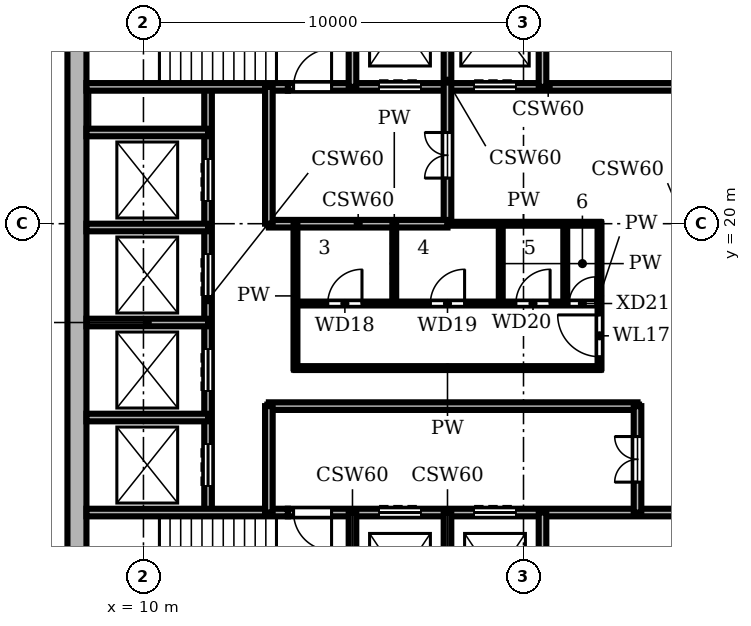
"""IFC4 building model, lengths in metres.
Left out: names, types, materials, properties, quantities, classifications, styles, units other than length and angle.
Written with IfcOpenShell. Run it as: python <this file> out.ifc"""

import sys

from ifc_helpers import new_model, si_unit, direction, frame, frame_2d, origin, place, context, subcontext, project, spatial, rectangle, extrude, element, fill, save


model = new_model("IFC4")
c1 = context("Model", 3, precision=1e-05, world=origin(), true_north=direction((0.0, 1.0)))
c2 = subcontext(c1, "Body", "Model", "MODEL_VIEW")
j1 = project(units=[si_unit("LENGTHUNIT", "METRE"), si_unit("PLANEANGLEUNIT", "RADIAN")], contexts=[c1])
p1 = place(None, origin())
s1 = spatial("IfcSite", under=j1, at=p1, CompositionType="ELEMENT")
p2 = place(p1, origin())
s2 = spatial("IfcBuilding", under=s1, at=p2, CompositionType="ELEMENT")
p3 = place(p2, frame((0.0, 0.0, 329.4)))
s3 = spatial("IfcBuildingStorey", under=s2, at=p3, CompositionType="ELEMENT", Elevation=329.4)
p4 = place(p3, frame((8.25, 27.5, 0.0), z_axis=(0.0, 0.0, 1.0), x_axis=(0.0, -1.0, 0.0)))
e1 = element("IfcWall", 1, at=p4, inside=s3, PredefinedType="SHEAR", context=c2, shape_type="SweptSolid", body=[
    extrude(rectangle(XDim=19.0, YDim=0.5, at=frame_2d((9.5, 0.0))), origin(), (0.0, 0.0, 1.0), 3.9),
])
p5 = place(p3, frame((8.5, 12.4, 0.0), z_axis=(0.0, 0.0, 1.0), x_axis=(1.0, 0.0, 0.0)))
e2 = element("IfcWall", 2, at=p5, inside=s3, PredefinedType="SHEAR", context=c2, shape_type="SweptSolid", body=[
    extrude(rectangle(XDim=5.3, YDim=0.2, at=frame_2d((2.65, 0.0))), origin(), (0.0, 0.0, 1.0), 3.45),
])
p6 = place(p3, frame((13.8, 12.4, 0.0), z_axis=(0.0, 0.0, 1.0), x_axis=(1.0, 0.0, 0.0)))
e3 = element("IfcWall", 3, at=p6, inside=s3, PredefinedType="SHEAR", context=c2, shape_type="SweptSolid", body=[
    extrude(rectangle(XDim=13.7, YDim=0.2, at=frame_2d((6.85, 0.0))), origin(), (0.0, 0.0, 1.0), 3.45),
])
p7 = place(p6, frame((2.4, 0.0, 0.0)))
e4 = element("IfcOpeningElement", 4, at=p7, cuts=e3, PredefinedType="OPENING", context=c2, shape_type="SweptSolid", body=[
    extrude(rectangle(XDim=1.1, YDim=2.1, at=frame_2d((0.55, 1.05))), frame((0.0, 0.11, 0.0), z_axis=(0.0, -1.0, 0.0), x_axis=(1.0, 0.0, 0.0)), (0.0, 0.0, 1.0), 0.22),
])
p8 = place(p6, frame((4.9, 0.0, 0.0)))
e5 = element("IfcOpeningElement", 5, at=p8, cuts=e3, PredefinedType="OPENING", context=c2, shape_type="SweptSolid", body=[
    extrude(rectangle(XDim=1.1, YDim=2.1, at=frame_2d((0.55, 1.05))), frame((0.0, 0.11, 0.0), z_axis=(0.0, -1.0, 0.0), x_axis=(1.0, 0.0, 0.0)), (0.0, 0.0, 1.0), 0.22),
])
p9 = place(p6, frame((0.15, 0.0, 0.0)))
e6 = element("IfcOpeningElement", 6, at=p9, cuts=e3, PredefinedType="OPENING", context=c2, shape_type="SweptSolid", body=[
    extrude(rectangle(XDim=1.0, YDim=2.1, at=frame_2d((0.5, 1.05))), frame((0.0, 0.11, 0.0), z_axis=(0.0, -1.0, 0.0), x_axis=(1.0, 0.0, 0.0)), (0.0, 0.0, 1.0), 0.22),
])
p10 = place(p3, frame((8.5, 14.9, 0.0), z_axis=(0.0, 0.0, 1.0), x_axis=(1.0, 0.0, 0.0)))
e7 = element("IfcWall", 7, at=p10, inside=s3, PredefinedType="SHEAR", context=c2, shape_type="SweptSolid", body=[
    extrude(rectangle(XDim=3.2, YDim=0.2, at=frame_2d((1.6, 0.0))), origin(), (0.0, 0.0, 1.0), 3.45),
])
p11 = place(p3, frame((13.3, 15.2, 0.0), z_axis=(0.0, 0.0, 1.0), x_axis=(1.0, 0.0, 0.0)))
e8 = element("IfcWall", 8, at=p11, inside=s3, PredefinedType="SHEAR", context=c2, shape_type="SweptSolid", body=[
    extrude(rectangle(XDim=9.7, YDim=0.2, at=frame_2d((4.85, 0.0))), origin(), (0.0, 0.0, 1.0), 3.45),
])
p12 = place(p3, frame((14.0, 16.2, 0.0), z_axis=(0.0, 0.0, 1.0), x_axis=(1.0, 0.0, 0.0)))
e9 = element("IfcWall", 9, at=p12, inside=s3, PredefinedType="PARTITIONING", context=c2, shape_type="SweptSolid", body=[
    extrude(rectangle(XDim=8.0, YDim=0.1, at=frame_2d((4.0, 0.0))), origin(), (0.0, 0.0, 1.0), 3.45),
])
p13 = place(p3, frame((8.5, 17.4, 0.0), z_axis=(0.0, 0.0, 1.0), x_axis=(1.0, 0.0, 0.0)))
e10 = element("IfcWall", 10, at=p13, inside=s3, PredefinedType="SHEAR", context=c2, shape_type="SweptSolid", body=[
    extrude(rectangle(XDim=3.2, YDim=0.2, at=frame_2d((1.6, 0.0))), origin(), (0.0, 0.0, 1.0), 3.45),
])
p14 = place(p3, frame((14.0, 17.9, 0.0), z_axis=(0.0, 0.0, 1.0), x_axis=(1.0, 0.0, 0.0)))
e11 = element("IfcWall", 11, at=p14, inside=s3, PredefinedType="PARTITIONING", context=c2, shape_type="SweptSolid", body=[
    extrude(rectangle(XDim=8.0, YDim=0.1, at=frame_2d((4.0, 0.0))), origin(), (0.0, 0.0, 1.0), 3.45),
])
p15 = place(p14, frame((0.85, 0.0, 0.0)))
e12 = element("IfcOpeningElement", 12, at=p15, cuts=e11, PredefinedType="OPENING", context=c2, shape_type="SweptSolid", body=[
    extrude(rectangle(XDim=0.9, YDim=2.1, at=frame_2d((0.45, 1.05))), frame((0.0, 0.06, 0.0), z_axis=(0.0, -1.0, 0.0), x_axis=(1.0, 0.0, 0.0)), (0.0, 0.0, 1.0), 0.12),
])
p16 = place(p14, frame((3.55, 0.0, 0.0)))
e13 = element("IfcOpeningElement", 13, at=p16, cuts=e11, PredefinedType="OPENING", context=c2, shape_type="SweptSolid", body=[
    extrude(rectangle(XDim=0.9, YDim=2.1, at=frame_2d((0.45, 1.05))), frame((0.0, 0.06, 0.0), z_axis=(0.0, -1.0, 0.0), x_axis=(1.0, 0.0, 0.0)), (0.0, 0.0, 1.0), 0.12),
])
p17 = place(p14, frame((5.8, 0.0, 0.0)))
e14 = element("IfcOpeningElement", 14, at=p17, cuts=e11, PredefinedType="OPENING", context=c2, shape_type="SweptSolid", body=[
    extrude(rectangle(XDim=0.9, YDim=2.1, at=frame_2d((0.45, 1.05))), frame((0.0, 0.06, 0.0), z_axis=(0.0, -1.0, 0.0), x_axis=(1.0, 0.0, 0.0)), (0.0, 0.0, 1.0), 0.12),
])
p18 = place(p14, frame((7.2, 0.0, 0.0)))
e15 = element("IfcOpeningElement", 15, at=p18, cuts=e11, PredefinedType="OPENING", context=c2, shape_type="SweptSolid", body=[
    extrude(rectangle(XDim=0.7, YDim=2.1, at=frame_2d((0.35, 1.05))), frame((0.0, 0.06, 0.0), z_axis=(0.0, -1.0, 0.0), x_axis=(1.0, 0.0, 0.0)), (0.0, 0.0, 1.0), 0.12),
])
p19 = place(p3, frame((8.5, 19.9, 0.0), z_axis=(0.0, 0.0, 1.0), x_axis=(1.0, 0.0, 0.0)))
e16 = element("IfcWall", 16, at=p19, inside=s3, PredefinedType="SHEAR", context=c2, shape_type="SweptSolid", body=[
    extrude(rectangle(XDim=3.2, YDim=0.2, at=frame_2d((1.6, 0.0))), origin(), (0.0, 0.0, 1.0), 3.45),
])
p20 = place(p3, frame((18.0, 20.0, 0.0), z_axis=(0.0, 0.0, 1.0), x_axis=(1.0, 0.0, 0.0)))
e17 = element("IfcWall", 17, at=p20, inside=s3, PredefinedType="PARTITIONING", context=c2, shape_type="SweptSolid", body=[
    extrude(rectangle(XDim=4.0, YDim=0.1, at=frame_2d((2.0, 0.0))), origin(), (0.0, 0.0, 1.0), 3.45),
])
p21 = place(p3, frame((13.3, 20.0, 0.0), z_axis=(0.0, 0.0, 1.0), x_axis=(1.0, 0.0, 0.0)))
e18 = element("IfcWall", 18, at=p21, inside=s3, PredefinedType="SHEAR", context=c2, shape_type="SweptSolid", body=[
    extrude(rectangle(XDim=4.7, YDim=0.2, at=frame_2d((2.35, 0.0))), origin(), (0.0, 0.0, 1.0), 3.45),
])
p22 = place(p3, frame((8.5, 22.4, 0.0), z_axis=(0.0, 0.0, 1.0), x_axis=(1.0, 0.0, 0.0)))
e19 = element("IfcWall", 19, at=p22, inside=s3, PredefinedType="SHEAR", context=c2, shape_type="SweptSolid", body=[
    extrude(rectangle(XDim=3.2, YDim=0.2, at=frame_2d((1.6, 0.0))), origin(), (0.0, 0.0, 1.0), 3.45),
])
p23 = place(p3, frame((8.5, 23.6, 0.0), z_axis=(0.0, 0.0, 1.0), x_axis=(1.0, 0.0, 0.0)))
e20 = element("IfcWall", 20, at=p23, inside=s3, PredefinedType="SHEAR", context=c2, shape_type="SweptSolid", body=[
    extrude(rectangle(XDim=5.3, YDim=0.2, at=frame_2d((2.65, 0.0))), origin(), (0.0, 0.0, 1.0), 3.45),
])
p24 = place(p3, frame((13.8, 23.6, 0.0), z_axis=(0.0, 0.0, 1.0), x_axis=(1.0, 0.0, 0.0)))
e21 = element("IfcWall", 21, at=p24, inside=s3, PredefinedType="SHEAR", context=c2, shape_type="SweptSolid", body=[
    extrude(rectangle(XDim=13.7, YDim=0.2, at=frame_2d((6.85, 0.0))), origin(), (0.0, 0.0, 1.0), 3.45),
])
p25 = place(p24, frame((2.4, 0.0, 0.0)))
e22 = element("IfcOpeningElement", 22, at=p25, cuts=e21, PredefinedType="OPENING", context=c2, shape_type="SweptSolid", body=[
    extrude(rectangle(XDim=1.1, YDim=2.1, at=frame_2d((0.55, 1.05))), frame((0.0, 0.11, 0.0), z_axis=(0.0, -1.0, 0.0), x_axis=(1.0, 0.0, 0.0)), (0.0, 0.0, 1.0), 0.22),
])
p26 = place(p24, frame((4.9, 0.0, 0.0)))
e23 = element("IfcOpeningElement", 23, at=p26, cuts=e21, PredefinedType="OPENING", context=c2, shape_type="SweptSolid", body=[
    extrude(rectangle(XDim=1.1, YDim=2.1, at=frame_2d((0.55, 1.05))), frame((0.0, 0.11, 0.0), z_axis=(0.0, -1.0, 0.0), x_axis=(1.0, 0.0, 0.0)), (0.0, 0.0, 1.0), 0.22),
])
p27 = place(p24, frame((0.15, 0.0, 0.0)))
e24 = element("IfcOpeningElement", 24, at=p27, cuts=e21, PredefinedType="OPENING", context=c2, shape_type="SweptSolid", body=[
    extrude(rectangle(XDim=1.0, YDim=2.1, at=frame_2d((0.5, 1.05))), frame((0.0, 0.11, 0.0), z_axis=(0.0, -1.0, 0.0), x_axis=(1.0, 0.0, 0.0)), (0.0, 0.0, 1.0), 0.22),
])
p28 = place(p3, frame((11.7, 12.4, 0.0), z_axis=(0.0, 0.0, 1.0), x_axis=(0.0, 1.0, 0.0)))
e25 = element("IfcWall", 25, at=p28, inside=s3, PredefinedType="SHEAR", context=c2, shape_type="SweptSolid", body=[
    extrude(rectangle(XDim=11.2, YDim=0.2, at=frame_2d((5.6, 0.0))), origin(), (0.0, 0.0, 1.0), 3.45),
])
p29 = place(p28, frame((0.7, 0.0, 0.0)))
e26 = element("IfcOpeningElement", 26, at=p29, cuts=e25, PredefinedType="OPENING", context=c2, shape_type="SweptSolid", body=[
    extrude(rectangle(XDim=1.1, YDim=2.1, at=frame_2d((0.55, 1.05))), frame((0.0, 0.11, 0.0), z_axis=(0.0, -1.0, 0.0), x_axis=(1.0, 0.0, 0.0)), (0.0, 0.0, 1.0), 0.22),
])
p30 = place(p28, frame((3.2, 0.0, 0.0)))
e27 = element("IfcOpeningElement", 27, at=p30, cuts=e25, PredefinedType="OPENING", context=c2, shape_type="SweptSolid", body=[
    extrude(rectangle(XDim=1.1, YDim=2.1, at=frame_2d((0.55, 1.05))), frame((0.0, 0.11, 0.0), z_axis=(0.0, -1.0, 0.0), x_axis=(1.0, 0.0, 0.0)), (0.0, 0.0, 1.0), 0.22),
])
p31 = place(p28, frame((5.7, 0.0, 0.0)))
e28 = element("IfcOpeningElement", 28, at=p31, cuts=e25, PredefinedType="OPENING", context=c2, shape_type="SweptSolid", body=[
    extrude(rectangle(XDim=1.1, YDim=2.1, at=frame_2d((0.55, 1.05))), frame((0.0, 0.11, 0.0), z_axis=(0.0, -1.0, 0.0), x_axis=(1.0, 0.0, 0.0)), (0.0, 0.0, 1.0), 0.22),
])
p32 = place(p28, frame((8.2, 0.0, 0.0)))
e29 = element("IfcOpeningElement", 29, at=p32, cuts=e25, PredefinedType="OPENING", context=c2, shape_type="SweptSolid", body=[
    extrude(rectangle(XDim=1.1, YDim=2.1, at=frame_2d((0.55, 1.05))), frame((0.0, 0.11, 0.0), z_axis=(0.0, -1.0, 0.0), x_axis=(1.0, 0.0, 0.0)), (0.0, 0.0, 1.0), 0.22),
])
p33 = place(p3, frame((13.3, 12.4, 0.0), z_axis=(0.0, 0.0, 1.0), x_axis=(0.0, 1.0, 0.0)))
e30 = element("IfcWall", 30, at=p33, inside=s3, PredefinedType="SHEAR", context=c2, shape_type="SweptSolid", body=[
    extrude(rectangle(XDim=2.8, YDim=0.2, at=frame_2d((1.4, 0.0))), origin(), (0.0, 0.0, 1.0), 3.45),
])
p34 = place(p3, frame((13.3, 20.0, 0.0), z_axis=(0.0, 0.0, 1.0), x_axis=(0.0, 1.0, 0.0)))
e31 = element("IfcWall", 31, at=p34, inside=s3, PredefinedType="SHEAR", context=c2, shape_type="SweptSolid", body=[
    extrude(rectangle(XDim=3.6, YDim=0.2, at=frame_2d((1.8, 0.0))), origin(), (0.0, 0.0, 1.0), 3.45),
])
p35 = place(p3, frame((14.0, 16.2, 0.0), z_axis=(0.0, 0.0, 1.0), x_axis=(0.0, 1.0, 0.0)))
e32 = element("IfcWall", 32, at=p35, inside=s3, PredefinedType="PARTITIONING", context=c2, shape_type="SweptSolid", body=[
    extrude(rectangle(XDim=3.8, YDim=0.1, at=frame_2d((1.9, 0.0))), origin(), (0.0, 0.0, 1.0), 3.45),
])
for number, where, z_axis, x_axis in (
    (33, (15.5, 8.5, 0.0), (0.0, 0.0, 1.0), (0.0, 1.0, 0.0)),
    (34, (15.5, 23.6, 0.0), (0.0, 0.0, 1.0), (0.0, 1.0, 0.0)),
):
    element("IfcWall", number, at=place(p3, frame(where, z_axis=z_axis, x_axis=x_axis)), inside=s3, PredefinedType="SHEAR", context=c2, shape_type="SweptSolid", body=[
        extrude(rectangle(XDim=3.9, YDim=0.2, at=frame_2d((1.95, 0.0))), origin(), (0.0, 0.0, 1.0), 3.45),
    ])
p36 = place(p3, frame((16.6, 17.9, 0.0), z_axis=(0.0, 0.0, 1.0), x_axis=(0.0, 1.0, 0.0)))
e35 = element("IfcWall", 35, at=p36, inside=s3, PredefinedType="PARTITIONING", context=c2, shape_type="SweptSolid", body=[
    extrude(rectangle(XDim=2.1, YDim=0.1, at=frame_2d((1.05, 0.0))), origin(), (0.0, 0.0, 1.0), 3.45),
])
p37 = place(p3, frame((18.0, 8.5, 0.0), z_axis=(0.0, 0.0, 1.0), x_axis=(0.0, 1.0, 0.0)))
e36 = element("IfcWall", 36, at=p37, inside=s3, PredefinedType="SHEAR", context=c2, shape_type="SweptSolid", body=[
    extrude(rectangle(XDim=3.9, YDim=0.2, at=frame_2d((1.95, 0.0))), origin(), (0.0, 0.0, 1.0), 3.45),
])
p38 = place(p3, frame((18.0, 20.0, 0.0), z_axis=(0.0, 0.0, 1.0), x_axis=(0.0, 1.0, 0.0)))
e37 = element("IfcWall", 37, at=p38, inside=s3, PredefinedType="SHEAR", context=c2, shape_type="SweptSolid", body=[
    extrude(rectangle(XDim=7.5, YDim=0.2, at=frame_2d((3.75, 0.0))), origin(), (0.0, 0.0, 1.0), 3.45),
])
p39 = place(p38, frame((1.2, 0.0, 0.0)))
e38 = element("IfcOpeningElement", 38, at=p39, cuts=e37, PredefinedType="OPENING", context=c2, shape_type="SweptSolid", body=[
    extrude(rectangle(XDim=1.2, YDim=2.1, at=frame_2d((0.6, 1.05))), frame((0.0, 0.11, 0.0), z_axis=(0.0, -1.0, 0.0), x_axis=(1.0, 0.0, 0.0)), (0.0, 0.0, 1.0), 0.22),
])
p40 = place(p3, frame((19.4, 17.9, 0.0), z_axis=(0.0, 0.0, 1.0), x_axis=(0.0, 1.0, 0.0)))
e39 = element("IfcWall", 39, at=p40, inside=s3, PredefinedType="PARTITIONING", context=c2, shape_type="SweptSolid", body=[
    extrude(rectangle(XDim=2.1, YDim=0.1, at=frame_2d((1.05, 0.0))), origin(), (0.0, 0.0, 1.0), 3.45),
])
for number, where, z_axis, x_axis in (
    (40, (20.5, 8.5, 0.0), (0.0, 0.0, 1.0), (0.0, 1.0, 0.0)),
    (41, (20.5, 23.6, 0.0), (0.0, 0.0, 1.0), (0.0, 1.0, 0.0)),
):
    element("IfcWall", number, at=place(p3, frame(where, z_axis=z_axis, x_axis=x_axis)), inside=s3, PredefinedType="SHEAR", context=c2, shape_type="SweptSolid", body=[
        extrude(rectangle(XDim=3.9, YDim=0.2, at=frame_2d((1.95, 0.0))), origin(), (0.0, 0.0, 1.0), 3.45),
    ])
p41 = place(p3, frame((21.1, 17.9, 0.0), z_axis=(0.0, 0.0, 1.0), x_axis=(0.0, 1.0, 0.0)))
e42 = element("IfcWall", 42, at=p41, inside=s3, PredefinedType="PARTITIONING", context=c2, shape_type="SweptSolid", body=[
    extrude(rectangle(XDim=2.1, YDim=0.1, at=frame_2d((1.05, 0.0))), origin(), (0.0, 0.0, 1.0), 3.45),
])
p42 = place(p3, frame((22.0, 16.2, 0.0), z_axis=(0.0, 0.0, 1.0), x_axis=(0.0, 1.0, 0.0)))
e43 = element("IfcWall", 43, at=p42, inside=s3, PredefinedType="PARTITIONING", context=c2, shape_type="SweptSolid", body=[
    extrude(rectangle(XDim=3.8, YDim=0.1, at=frame_2d((1.9, 0.0))), origin(), (0.0, 0.0, 1.0), 3.45),
])
p43 = place(p42, frame((0.3, 0.0, 0.0)))
e44 = element("IfcOpeningElement", 44, at=p43, cuts=e43, PredefinedType="OPENING", context=c2, shape_type="SweptSolid", body=[
    extrude(rectangle(XDim=1.1, YDim=2.1, at=frame_2d((0.55, 1.05))), frame((0.0, 0.06, 0.0), z_axis=(0.0, -1.0, 0.0), x_axis=(1.0, 0.0, 0.0)), (0.0, 0.0, 1.0), 0.12),
])
p44 = place(p3, frame((23.0, 12.4, 0.0), z_axis=(0.0, 0.0, 1.0), x_axis=(0.0, 1.0, 0.0)))
e45 = element("IfcWall", 45, at=p44, inside=s3, PredefinedType="SHEAR", context=c2, shape_type="SweptSolid", body=[
    extrude(rectangle(XDim=2.8, YDim=0.2, at=frame_2d((1.4, 0.0))), origin(), (0.0, 0.0, 1.0), 3.45),
])
p45 = place(p44, frame((0.8, 0.0, 0.0)))
e46 = element("IfcOpeningElement", 46, at=p45, cuts=e45, PredefinedType="OPENING", context=c2, shape_type="SweptSolid", body=[
    extrude(rectangle(XDim=1.2, YDim=2.1, at=frame_2d((0.6, 1.05))), frame((0.0, 0.11, 0.0), z_axis=(0.0, -1.0, 0.0), x_axis=(1.0, 0.0, 0.0)), (0.0, 0.0, 1.0), 0.22),
])
p46 = place(p29, origin())
e47 = element("IfcDoor", 47, at=p46, inside=s3, OperationType="DOUBLE_DOOR_SLIDING", PredefinedType="DOOR", context=c2, shape_type="SweptSolid", body=[
    extrude(rectangle(XDim=1.1, YDim=2.1, at=frame_2d((0.55, 1.05))), frame((0.0, 0.025, 0.0), z_axis=(0.0, -1.0, 0.0), x_axis=(1.0, 0.0, 0.0)), (0.0, 0.0, 1.0), 0.05),
])
fill(e26, e47)
p47 = place(p30, origin())
e48 = element("IfcDoor", 48, at=p47, inside=s3, OperationType="DOUBLE_DOOR_SLIDING", PredefinedType="DOOR", context=c2, shape_type="SweptSolid", body=[
    extrude(rectangle(XDim=1.1, YDim=2.1, at=frame_2d((0.55, 1.05))), frame((0.0, 0.025, 0.0), z_axis=(0.0, -1.0, 0.0), x_axis=(1.0, 0.0, 0.0)), (0.0, 0.0, 1.0), 0.05),
])
fill(e27, e48)
p48 = place(p31, origin())
e49 = element("IfcDoor", 49, at=p48, inside=s3, OperationType="DOUBLE_DOOR_SLIDING", PredefinedType="DOOR", context=c2, shape_type="SweptSolid", body=[
    extrude(rectangle(XDim=1.1, YDim=2.1, at=frame_2d((0.55, 1.05))), frame((0.0, 0.025, 0.0), z_axis=(0.0, -1.0, 0.0), x_axis=(1.0, 0.0, 0.0)), (0.0, 0.0, 1.0), 0.05),
])
fill(e28, e49)
p49 = place(p32, origin())
e50 = element("IfcDoor", 50, at=p49, inside=s3, OperationType="DOUBLE_DOOR_SLIDING", PredefinedType="DOOR", context=c2, shape_type="SweptSolid", body=[
    extrude(rectangle(XDim=1.1, YDim=2.1, at=frame_2d((0.55, 1.05))), frame((0.0, 0.025, 0.0), z_axis=(0.0, -1.0, 0.0), x_axis=(1.0, 0.0, 0.0)), (0.0, 0.0, 1.0), 0.05),
])
fill(e29, e50)
p50 = place(p7, origin())
e51 = element("IfcDoor", 51, at=p50, inside=s3, OperationType="DOUBLE_DOOR_SLIDING", PredefinedType="DOOR", context=c2, shape_type="SweptSolid", body=[
    extrude(rectangle(XDim=1.1, YDim=2.1, at=frame_2d((0.55, 1.05))), frame((0.0, 0.025, 0.0), z_axis=(0.0, -1.0, 0.0), x_axis=(1.0, 0.0, 0.0)), (0.0, 0.0, 1.0), 0.05),
])
fill(e4, e51)
p51 = place(p8, origin())
e52 = element("IfcDoor", 52, at=p51, inside=s3, OperationType="DOUBLE_DOOR_SLIDING", PredefinedType="DOOR", context=c2, shape_type="SweptSolid", body=[
    extrude(rectangle(XDim=1.1, YDim=2.1, at=frame_2d((0.55, 1.05))), frame((0.0, 0.025, 0.0), z_axis=(0.0, -1.0, 0.0), x_axis=(1.0, 0.0, 0.0)), (0.0, 0.0, 1.0), 0.05),
])
fill(e5, e52)
p52 = place(p25, origin())
e53 = element("IfcDoor", 53, at=p52, inside=s3, OperationType="DOUBLE_DOOR_SLIDING", PredefinedType="DOOR", context=c2, shape_type="SweptSolid", body=[
    extrude(rectangle(XDim=1.1, YDim=2.1, at=frame_2d((0.55, 1.05))), frame((0.0, 0.025, 0.0), z_axis=(0.0, -1.0, 0.0), x_axis=(1.0, 0.0, 0.0)), (0.0, 0.0, 1.0), 0.05),
])
fill(e22, e53)
p53 = place(p26, origin())
e54 = element("IfcDoor", 54, at=p53, inside=s3, OperationType="DOUBLE_DOOR_SLIDING", PredefinedType="DOOR", context=c2, shape_type="SweptSolid", body=[
    extrude(rectangle(XDim=1.1, YDim=2.1, at=frame_2d((0.55, 1.05))), frame((0.0, 0.025, 0.0), z_axis=(0.0, -1.0, 0.0), x_axis=(1.0, 0.0, 0.0)), (0.0, 0.0, 1.0), 0.05),
])
fill(e23, e54)
p54 = place(p9, frame((1.0, 0.0, 0.0), z_axis=(0.0, 0.0, 1.0), x_axis=(-1.0, 0.0, 0.0)))
e55 = element("IfcDoor", 55, at=p54, inside=s3, OperationType="SINGLE_SWING_LEFT", PredefinedType="DOOR", context=c2, shape_type="SweptSolid", body=[
    extrude(rectangle(XDim=1.0, YDim=2.1, at=frame_2d((0.5, 1.05))), frame((0.0, 0.025, 0.0), z_axis=(0.0, -1.0, 0.0), x_axis=(1.0, 0.0, 0.0)), (0.0, 0.0, 1.0), 0.05),
])
fill(e6, e55)
p55 = place(p27, origin())
e56 = element("IfcDoor", 56, at=p55, inside=s3, OperationType="SINGLE_SWING_RIGHT", PredefinedType="DOOR", context=c2, shape_type="SweptSolid", body=[
    extrude(rectangle(XDim=1.0, YDim=2.1, at=frame_2d((0.5, 1.05))), frame((0.0, 0.025, 0.0), z_axis=(0.0, -1.0, 0.0), x_axis=(1.0, 0.0, 0.0)), (0.0, 0.0, 1.0), 0.05),
])
fill(e24, e56)
p56 = place(p45, origin())
e57 = element("IfcDoor", 57, at=p56, inside=s3, OperationType="DOUBLE_DOOR_SINGLE_SWING", PredefinedType="DOOR", context=c2, shape_type="SweptSolid", body=[
    extrude(rectangle(XDim=1.2, YDim=2.1, at=frame_2d((0.6, 1.05))), frame((0.0, 0.025, 0.0), z_axis=(0.0, -1.0, 0.0), x_axis=(1.0, 0.0, 0.0)), (0.0, 0.0, 1.0), 0.05),
])
fill(e46, e57)
p57 = place(p39, origin())
e58 = element("IfcDoor", 58, at=p57, inside=s3, OperationType="DOUBLE_DOOR_SINGLE_SWING", PredefinedType="DOOR", context=c2, shape_type="SweptSolid", body=[
    extrude(rectangle(XDim=1.2, YDim=2.1, at=frame_2d((0.6, 1.05))), frame((0.0, 0.025, 0.0), z_axis=(0.0, -1.0, 0.0), x_axis=(1.0, 0.0, 0.0)), (0.0, 0.0, 1.0), 0.05),
])
fill(e38, e58)
p58 = place(p43, origin())
e59 = element("IfcDoor", 59, at=p58, inside=s3, OperationType="SINGLE_SWING_RIGHT", PredefinedType="DOOR", context=c2, shape_type="SweptSolid", body=[
    extrude(rectangle(XDim=1.1, YDim=2.1, at=frame_2d((0.55, 1.05))), frame((0.0, 0.025, 0.0), z_axis=(0.0, -1.0, 0.0), x_axis=(1.0, 0.0, 0.0)), (0.0, 0.0, 1.0), 0.05),
])
fill(e44, e59)
p59 = place(p15, origin())
e60 = element("IfcDoor", 60, at=p59, inside=s3, OperationType="SINGLE_SWING_RIGHT", PredefinedType="DOOR", context=c2, shape_type="SweptSolid", body=[
    extrude(rectangle(XDim=0.9, YDim=2.1, at=frame_2d((0.45, 1.05))), frame((0.0, 0.025, 0.0), z_axis=(0.0, -1.0, 0.0), x_axis=(1.0, 0.0, 0.0)), (0.0, 0.0, 1.0), 0.05),
])
fill(e12, e60)
p60 = place(p16, origin())
e61 = element("IfcDoor", 61, at=p60, inside=s3, OperationType="SINGLE_SWING_RIGHT", PredefinedType="DOOR", context=c2, shape_type="SweptSolid", body=[
    extrude(rectangle(XDim=0.9, YDim=2.1, at=frame_2d((0.45, 1.05))), frame((0.0, 0.025, 0.0), z_axis=(0.0, -1.0, 0.0), x_axis=(1.0, 0.0, 0.0)), (0.0, 0.0, 1.0), 0.05),
])
fill(e13, e61)
p61 = place(p17, origin())
e62 = element("IfcDoor", 62, at=p61, inside=s3, OperationType="SINGLE_SWING_RIGHT", PredefinedType="DOOR", context=c2, shape_type="SweptSolid", body=[
    extrude(rectangle(XDim=0.9, YDim=2.1, at=frame_2d((0.45, 1.05))), frame((0.0, 0.025, 0.0), z_axis=(0.0, -1.0, 0.0), x_axis=(1.0, 0.0, 0.0)), (0.0, 0.0, 1.0), 0.05),
])
fill(e14, e62)
p62 = place(p18, origin())
e63 = element("IfcDoor", 63, at=p62, inside=s3, OperationType="SINGLE_SWING_RIGHT", PredefinedType="DOOR", context=c2, shape_type="SweptSolid", body=[
    extrude(rectangle(XDim=0.7, YDim=2.1, at=frame_2d((0.35, 1.05))), frame((0.0, 0.025, 0.0), z_axis=(0.0, -1.0, 0.0), x_axis=(1.0, 0.0, 0.0)), (0.0, 0.0, 1.0), 0.05),
])
fill(e15, e63)
save(model, sys.argv[1])
